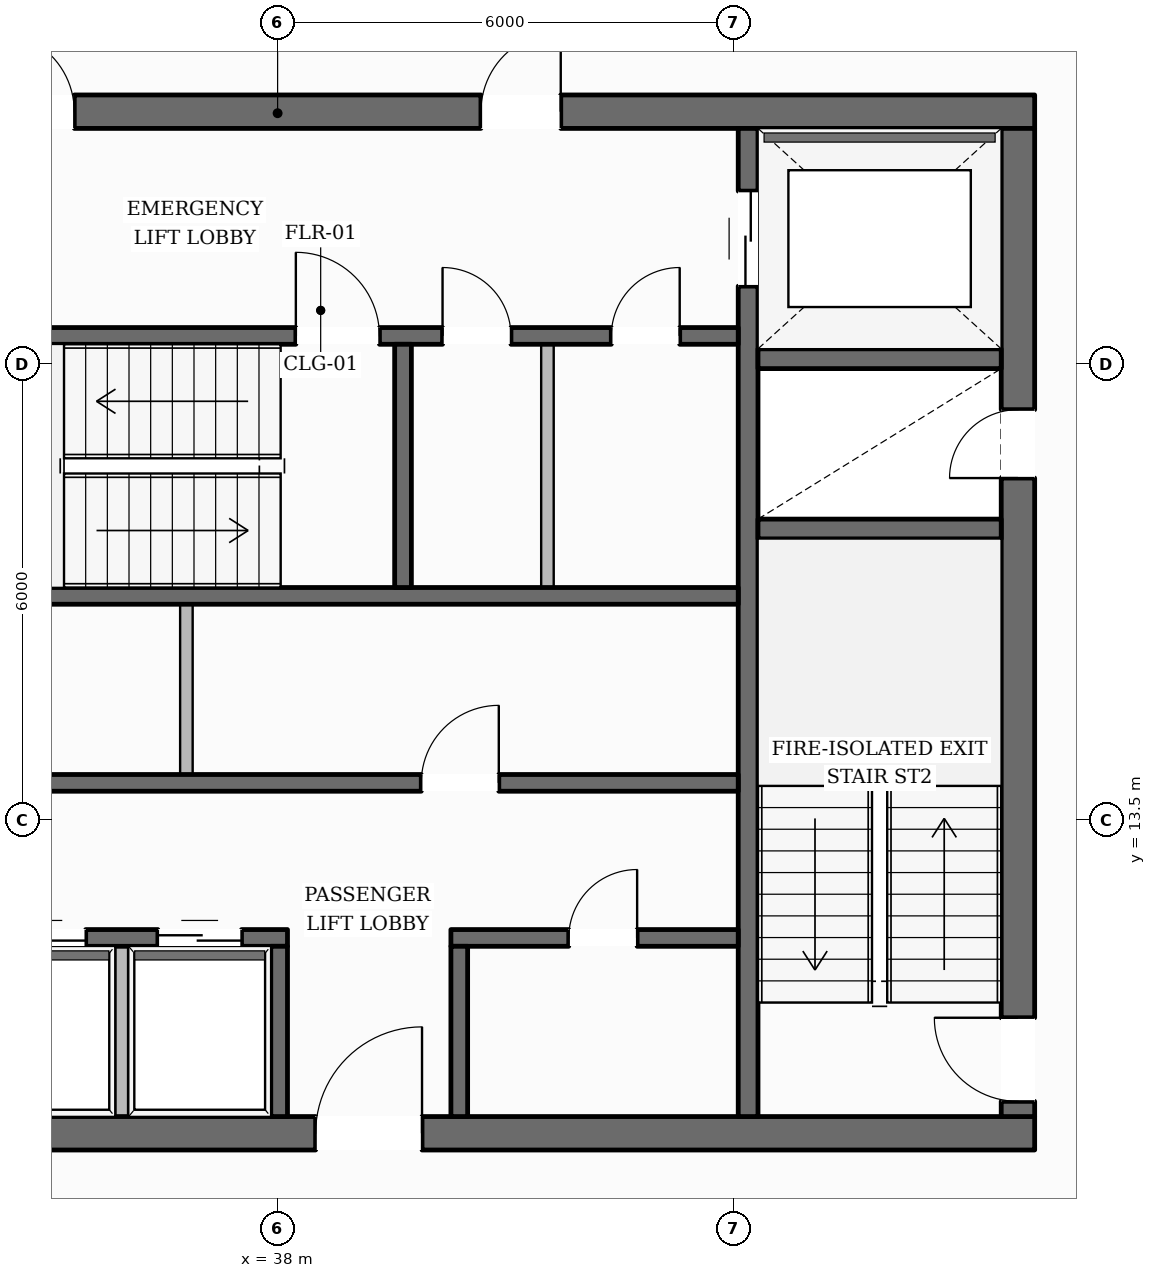
"""IFC4 building model, lengths in metres.
Left out: names, types, materials, properties, quantities, classifications, styles, units other than length and angle.
Written with IfcOpenShell. Run it as: python <this file> out.ifc"""

import sys

from ifc_helpers import new_model, si_unit, direction, frame, frame_2d, origin, place, context, subcontext, project, spatial, rectangle, extrude, element, fill, save


model = new_model("IFC4")
c1 = context("Model", 3, precision=1e-05, world=origin(), true_north=direction((0.0, 1.0)))
c2 = subcontext(c1, "Body", "Model", "MODEL_VIEW")
j1 = project(units=[si_unit("LENGTHUNIT", "METRE"), si_unit("PLANEANGLEUNIT", "RADIAN")], contexts=[c1])
p1 = place(None, origin())
s1 = spatial("IfcSite", under=j1, at=p1, CompositionType="ELEMENT")
p2 = place(p1, origin())
s2 = spatial("IfcBuilding", under=s1, at=p2, CompositionType="ELEMENT")
p3 = place(p2, frame((0.0, 0.0, 226.6)))
s3 = spatial("IfcBuildingStorey", under=s2, at=p3, CompositionType="ELEMENT", Elevation=226.6)
p4 = place(p3, frame((28.04, 9.38, 0.0), z_axis=(0.0, 0.0, 1.0), x_axis=(1.0, 0.0, 0.0)))
e1 = element("IfcWall", 1, at=p4, inside=s3, PredefinedType="SOLIDWALL", context=c2, shape_type="SweptSolid", body=[
    extrude(rectangle(XDim=19.92, YDim=0.44, at=frame_2d((9.96, 0.0))), origin(), (0.0, 0.0, 1.0), 3.6),
])
p5 = place(p4, frame((10.46, 0.0, 0.0)))
e2 = element("IfcOpeningElement", 2, at=p5, cuts=e1, PredefinedType="OPENING", context=c2, shape_type="SweptSolid", body=[
    extrude(rectangle(XDim=1.4, YDim=2.2, at=frame_2d((0.7, 1.1))), frame((0.0, 0.23, 0.0), z_axis=(0.0, -1.0, 0.0), x_axis=(1.0, 0.0, 0.0)), (0.0, 0.0, 1.0), 0.46),
])
p6 = place(p3, frame((28.04, 22.82, 0.0), z_axis=(0.0, 0.0, 1.0), x_axis=(1.0, 0.0, 0.0)))
e3 = element("IfcWall", 3, at=p6, inside=s3, PredefinedType="SOLIDWALL", context=c2, shape_type="SweptSolid", body=[
    extrude(rectangle(XDim=19.92, YDim=0.44, at=frame_2d((9.96, 0.0))), origin(), (0.0, 0.0, 1.0), 3.6),
])
p7 = place(p6, frame((6.235, 0.0, 0.0)))
e4 = element("IfcOpeningElement", 4, at=p7, cuts=e3, PredefinedType="OPENING", context=c2, shape_type="SweptSolid", body=[
    extrude(rectangle(XDim=1.05, YDim=2.15, at=frame_2d((0.525, 1.075))), frame((0.0, 0.23, 0.0), z_axis=(0.0, -1.0, 0.0), x_axis=(1.0, 0.0, 0.0)), (0.0, 0.0, 1.0), 0.46),
])
p8 = place(p6, frame((12.635, 0.0, 0.0)))
e5 = element("IfcOpeningElement", 5, at=p8, cuts=e3, PredefinedType="OPENING", context=c2, shape_type="SweptSolid", body=[
    extrude(rectangle(XDim=1.05, YDim=2.15, at=frame_2d((0.525, 1.075))), frame((0.0, 0.23, 0.0), z_axis=(0.0, -1.0, 0.0), x_axis=(1.0, 0.0, 0.0)), (0.0, 0.0, 1.0), 0.46),
])
p9 = place(p3, frame((47.74, 9.6, 0.0), z_axis=(0.0, 0.0, 1.0), x_axis=(0.0, 1.0, 0.0)))
e6 = element("IfcWall", 6, at=p9, inside=s3, PredefinedType="SOLIDWALL", context=c2, shape_type="SweptSolid", body=[
    extrude(rectangle(XDim=13.0, YDim=0.44, at=frame_2d((6.5, 0.0))), origin(), (0.0, 0.0, 1.0), 3.6),
])
p10 = place(p9, frame((0.2, 0.0, 0.0)))
e7 = element("IfcOpeningElement", 7, at=p10, cuts=e6, PredefinedType="OPENING", context=c2, shape_type="SweptSolid", body=[
    extrude(rectangle(XDim=1.1, YDim=2.15, at=frame_2d((0.55, 1.075))), frame((0.0, 0.23, 0.0), z_axis=(0.0, -1.0, 0.0), x_axis=(1.0, 0.0, 0.0)), (0.0, 0.0, 1.0), 0.46),
])
p11 = place(p9, frame((8.4, 0.0, 0.0)))
e8 = element("IfcOpeningElement", 8, at=p11, cuts=e6, PredefinedType="OPENING", context=c2, shape_type="SweptSolid", body=[
    extrude(rectangle(XDim=0.9, YDim=2.1, at=frame_2d((0.45, 1.05))), frame((0.0, 0.23, 0.0), z_axis=(0.0, -1.0, 0.0), x_axis=(1.0, 0.0, 0.0)), (0.0, 0.0, 1.0), 0.46),
])
p12 = place(p3, frame((44.19, 9.6, 0.0), z_axis=(0.0, 0.0, 1.0), x_axis=(0.0, 1.0, 0.0)))
e9 = element("IfcWall", 9, at=p12, inside=s3, PredefinedType="SHEAR", context=c2, shape_type="SweptSolid", body=[
    extrude(rectangle(XDim=13.0, YDim=0.26, at=frame_2d((6.5, 0.0))), origin(), (0.0, 0.0, 1.0), 3.6),
])
p13 = place(p12, frame((10.925, 0.0, 0.0)))
e10 = element("IfcOpeningElement", 10, at=p13, cuts=e9, PredefinedType="OPENING", context=c2, shape_type="SweptSolid", body=[
    extrude(rectangle(XDim=1.25, YDim=2.25, at=frame_2d((0.625, 1.125))), frame((0.0, 0.14, 0.0), z_axis=(0.0, -1.0, 0.0), x_axis=(1.0, 0.0, 0.0)), (0.0, 0.0, 1.0), 0.28),
])
for number, where, z_axis, x_axis in (
    (11, (44.32, 17.33, 0.0), (0.0, 0.0, 1.0), (1.0, 0.0, 0.0)),
    (12, (44.32, 19.57, 0.0), (0.0, 0.0, 1.0), (1.0, 0.0, 0.0)),
):
    element("IfcWall", number, at=place(p3, frame(where, z_axis=z_axis, x_axis=x_axis)), inside=s3, PredefinedType="SHEAR", context=c2, shape_type="SweptSolid", body=[
        extrude(rectangle(XDim=3.2, YDim=0.26, at=frame_2d((1.6, 0.0))), origin(), (0.0, 0.0, 1.0), 3.6),
    ])
p14 = place(p3, frame((31.94, 19.87, 0.0), z_axis=(0.0, 0.0, 1.0), x_axis=(1.0, 0.0, 0.0)))
e13 = element("IfcWall", 13, at=p14, inside=s3, PredefinedType="SOLIDWALL", context=c2, shape_type="SweptSolid", body=[
    extrude(rectangle(XDim=12.12, YDim=0.22, at=frame_2d((6.06, 0.0))), origin(), (0.0, 0.0, 1.0), 3.6),
])
p15 = place(p14, frame((6.3, 0.0, 0.0)))
e14 = element("IfcOpeningElement", 14, at=p15, cuts=e13, PredefinedType="OPENING", context=c2, shape_type="SweptSolid", body=[
    extrude(rectangle(XDim=1.1, YDim=2.15, at=frame_2d((0.55, 1.075))), frame((0.0, 0.12, 0.0), z_axis=(0.0, -1.0, 0.0), x_axis=(1.0, 0.0, 0.0)), (0.0, 0.0, 1.0), 0.24),
])
p16 = place(p14, frame((8.23, 0.0, 0.0)))
e15 = element("IfcOpeningElement", 15, at=p16, cuts=e13, PredefinedType="OPENING", context=c2, shape_type="SweptSolid", body=[
    extrude(rectangle(XDim=0.9, YDim=2.1, at=frame_2d((0.45, 1.05))), frame((0.0, 0.12, 0.0), z_axis=(0.0, -1.0, 0.0), x_axis=(1.0, 0.0, 0.0)), (0.0, 0.0, 1.0), 0.24),
])
p17 = place(p14, frame((10.45, 0.0, 0.0)))
e16 = element("IfcOpeningElement", 16, at=p17, cuts=e13, PredefinedType="OPENING", context=c2, shape_type="SweptSolid", body=[
    extrude(rectangle(XDim=0.9, YDim=2.1, at=frame_2d((0.45, 1.05))), frame((0.0, 0.12, 0.0), z_axis=(0.0, -1.0, 0.0), x_axis=(1.0, 0.0, 0.0)), (0.0, 0.0, 1.0), 0.24),
])
p18 = place(p3, frame((31.94, 16.45, 0.0), z_axis=(0.0, 0.0, 1.0), x_axis=(1.0, 0.0, 0.0)))
e17 = element("IfcWall", 17, at=p18, inside=s3, PredefinedType="SOLIDWALL", context=c2, shape_type="SweptSolid", body=[
    extrude(rectangle(XDim=12.12, YDim=0.22, at=frame_2d((6.06, 0.0))), origin(), (0.0, 0.0, 1.0), 3.6),
])
p19 = place(p3, frame((39.65, 16.56, 0.0), z_axis=(0.0, 0.0, 1.0), x_axis=(0.0, 1.0, 0.0)))
e18 = element("IfcWall", 18, at=p19, inside=s3, PredefinedType="SOLIDWALL", context=c2, shape_type="SweptSolid", body=[
    extrude(rectangle(XDim=3.2, YDim=0.22, at=frame_2d((1.6, 0.0))), origin(), (0.0, 0.0, 1.0), 3.6),
])
p20 = place(p3, frame((31.94, 13.99, 0.0), z_axis=(0.0, 0.0, 1.0), x_axis=(1.0, 0.0, 0.0)))
e19 = element("IfcWall", 19, at=p20, inside=s3, PredefinedType="SOLIDWALL", context=c2, shape_type="SweptSolid", body=[
    extrude(rectangle(XDim=12.12, YDim=0.22, at=frame_2d((6.06, 0.0))), origin(), (0.0, 0.0, 1.0), 3.6),
])
p21 = place(p20, frame((1.91, 0.0, 0.0)))
e20 = element("IfcOpeningElement", 20, at=p21, cuts=e19, PredefinedType="OPENING", context=c2, shape_type="SweptSolid", body=[
    extrude(rectangle(XDim=0.9, YDim=2.1, at=frame_2d((0.45, 1.05))), frame((0.0, 0.12, 0.0), z_axis=(0.0, -1.0, 0.0), x_axis=(1.0, 0.0, 0.0)), (0.0, 0.0, 1.0), 0.24),
])
p22 = place(p20, frame((7.95, 0.0, 0.0)))
e21 = element("IfcOpeningElement", 21, at=p22, cuts=e19, PredefinedType="OPENING", context=c2, shape_type="SweptSolid", body=[
    extrude(rectangle(XDim=1.02, YDim=2.15, at=frame_2d((0.51, 1.075))), frame((0.0, 0.12, 0.0), z_axis=(0.0, -1.0, 0.0), x_axis=(1.0, 0.0, 0.0)), (0.0, 0.0, 1.0), 0.24),
])
p23 = place(p3, frame((31.94, 11.95, 0.0), z_axis=(0.0, 0.0, 1.0), x_axis=(1.0, 0.0, 0.0)))
e22 = element("IfcWall", 22, at=p23, inside=s3, PredefinedType="SOLIDWALL", context=c2, shape_type="SweptSolid", body=[
    extrude(rectangle(XDim=6.19, YDim=0.22, at=frame_2d((3.095, 0.0))), origin(), (0.0, 0.0, 1.0), 3.6),
])
p24 = place(p23, frame((0.385, 0.0, 0.0)))
e23 = element("IfcOpeningElement", 23, at=p24, cuts=e22, PredefinedType="OPENING", context=c2, shape_type="SweptSolid", body=[
    extrude(rectangle(XDim=1.1, YDim=2.2, at=frame_2d((0.55, 1.1))), frame((0.0, 0.12, 0.0), z_axis=(0.0, -1.0, 0.0), x_axis=(1.0, 0.0, 0.0)), (0.0, 0.0, 1.0), 0.24),
])
p25 = place(p23, frame((2.435, 0.0, 0.0)))
e24 = element("IfcOpeningElement", 24, at=p25, cuts=e22, PredefinedType="OPENING", context=c2, shape_type="SweptSolid", body=[
    extrude(rectangle(XDim=1.1, YDim=2.2, at=frame_2d((0.55, 1.1))), frame((0.0, 0.12, 0.0), z_axis=(0.0, -1.0, 0.0), x_axis=(1.0, 0.0, 0.0)), (0.0, 0.0, 1.0), 0.24),
])
p26 = place(p23, frame((4.485, 0.0, 0.0)))
e25 = element("IfcOpeningElement", 25, at=p26, cuts=e22, PredefinedType="OPENING", context=c2, shape_type="SweptSolid", body=[
    extrude(rectangle(XDim=1.1, YDim=2.2, at=frame_2d((0.55, 1.1))), frame((0.0, 0.12, 0.0), z_axis=(0.0, -1.0, 0.0), x_axis=(1.0, 0.0, 0.0)), (0.0, 0.0, 1.0), 0.24),
])
p27 = place(p3, frame((40.28, 11.95, 0.0), z_axis=(0.0, 0.0, 1.0), x_axis=(1.0, 0.0, 0.0)))
e26 = element("IfcWall", 26, at=p27, inside=s3, PredefinedType="SOLIDWALL", context=c2, shape_type="SweptSolid", body=[
    extrude(rectangle(XDim=3.78, YDim=0.22, at=frame_2d((1.89, 0.0))), origin(), (0.0, 0.0, 1.0), 3.6),
])
p28 = place(p27, frame((1.55, 0.0, 0.0)))
e27 = element("IfcOpeningElement", 27, at=p28, cuts=e26, PredefinedType="OPENING", context=c2, shape_type="SweptSolid", body=[
    extrude(rectangle(XDim=0.9, YDim=2.1, at=frame_2d((0.45, 1.05))), frame((0.0, 0.12, 0.0), z_axis=(0.0, -1.0, 0.0), x_axis=(1.0, 0.0, 0.0)), (0.0, 0.0, 1.0), 0.24),
])
for number, where, z_axis, x_axis in (
    (28, (38.02, 9.6, 0.0), (0.0, 0.0, 1.0), (0.0, 1.0, 0.0)),
    (29, (40.39, 9.6, 0.0), (0.0, 0.0, 1.0), (0.0, 1.0, 0.0)),
):
    element("IfcWall", number, at=place(p3, frame(where, z_axis=z_axis, x_axis=x_axis)), inside=s3, PredefinedType="SOLIDWALL", context=c2, shape_type="SweptSolid", body=[
        extrude(rectangle(XDim=2.24, YDim=0.22, at=frame_2d((1.12, 0.0))), origin(), (0.0, 0.0, 1.0), 3.6),
    ])
p29 = place(p3, frame((41.74, 45.312, 0.0), z_axis=(0.0, 0.0, 1.0), x_axis=(0.491560367125, -0.870843502285, 0.0)))
e30 = element("IfcWall", 30, at=p29, inside=s3, PredefinedType="STANDARD", context=c2, shape_type="SweptSolid", body=[
    extrude(rectangle(XDim=39.17, YDim=0.35, at=frame_2d((19.585, 0.0))), origin(), (0.0, 0.0, 1.0), 3.132),
])
p30 = place(p29, frame((34.788, 0.0, 0.65)))
e31 = element("IfcOpeningElement", 31, at=p30, cuts=e30, PredefinedType="OPENING", context=c2, shape_type="SweptSolid", body=[
    extrude(rectangle(XDim=1.45, YDim=1.75, at=frame_2d((0.725, 0.875))), frame((0.0, 0.185, 0.0), z_axis=(0.0, -1.0, 0.0), x_axis=(1.0, 0.0, 0.0)), (0.0, 0.0, 1.0), 0.37),
])
p31 = place(p29, frame((28.419, 0.0, 0.65)))
e32 = element("IfcOpeningElement", 32, at=p31, cuts=e30, PredefinedType="OPENING", context=c2, shape_type="SweptSolid", body=[
    extrude(rectangle(XDim=1.45, YDim=1.75, at=frame_2d((0.725, 0.875))), frame((0.0, 0.185, 0.0), z_axis=(0.0, -1.0, 0.0), x_axis=(1.0, 0.0, 0.0)), (0.0, 0.0, 1.0), 0.37),
])
p32 = place(p29, frame((15.68, 0.0, 0.65)))
e33 = element("IfcOpeningElement", 33, at=p32, cuts=e30, PredefinedType="OPENING", context=c2, shape_type="SweptSolid", body=[
    extrude(rectangle(XDim=1.45, YDim=1.75, at=frame_2d((0.725, 0.875))), frame((0.0, 0.185, 0.0), z_axis=(0.0, -1.0, 0.0), x_axis=(1.0, 0.0, 0.0)), (0.0, 0.0, 1.0), 0.37),
])
p33 = place(p29, frame((9.311, 0.0, 0.65)))
e34 = element("IfcOpeningElement", 34, at=p33, cuts=e30, PredefinedType="OPENING", context=c2, shape_type="SweptSolid", body=[
    extrude(rectangle(XDim=1.45, YDim=1.75, at=frame_2d((0.725, 0.875))), frame((0.0, 0.185, 0.0), z_axis=(0.0, -1.0, 0.0), x_axis=(1.0, 0.0, 0.0)), (0.0, 0.0, 1.0), 0.37),
])
p34 = place(p29, frame((2.942, 0.0, 0.65)))
e35 = element("IfcOpeningElement", 35, at=p34, cuts=e30, PredefinedType="OPENING", context=c2, shape_type="SweptSolid", body=[
    extrude(rectangle(XDim=1.45, YDim=1.75, at=frame_2d((0.725, 0.875))), frame((0.0, 0.185, 0.0), z_axis=(0.0, -1.0, 0.0), x_axis=(1.0, 0.0, 0.0)), (0.0, 0.0, 1.0), 0.37),
])
p35 = place(p3, frame((35.95, 9.52, 0.0), z_axis=(0.0, 0.0, 1.0), x_axis=(0.0, 1.0, 0.0)))
e36 = element("IfcWall", 36, at=p35, inside=s3, PredefinedType="PARTITIONING", context=c2, shape_type="SweptSolid", body=[
    extrude(rectangle(XDim=2.32, YDim=0.165, at=frame_2d((1.16, 0.0))), origin(), (0.0, 0.0, 1.0), 3.6),
])
p36 = place(p3, frame((36.8, 14.1, 0.0), z_axis=(0.0, 0.0, 1.0), x_axis=(0.0, 1.0, 0.0)))
e37 = element("IfcWall", 37, at=p36, inside=s3, PredefinedType="PARTITIONING", context=c2, shape_type="SweptSolid", body=[
    extrude(rectangle(XDim=2.24, YDim=0.165, at=frame_2d((1.12, 0.0))), origin(), (0.0, 0.0, 1.0), 3.6),
])
p37 = place(p3, frame((41.55, 16.56, 0.0), z_axis=(0.0, 0.0, 1.0), x_axis=(0.0, 1.0, 0.0)))
e38 = element("IfcWall", 38, at=p37, inside=s3, PredefinedType="PARTITIONING", context=c2, shape_type="SweptSolid", body=[
    extrude(rectangle(XDim=3.2, YDim=0.165, at=frame_2d((1.6, 0.0))), origin(), (0.0, 0.0, 1.0), 3.6),
])
p38 = place(p10, origin())
e39 = element("IfcDoor", 39, at=p38, inside=s3, OperationType="SINGLE_SWING_RIGHT", PredefinedType="DOOR", context=c2, shape_type="SweptSolid", body=[
    extrude(rectangle(XDim=1.1, YDim=2.15, at=frame_2d((0.55, 1.075))), frame((0.0, 0.025, 0.0), z_axis=(0.0, -1.0, 0.0), x_axis=(1.0, 0.0, 0.0)), (0.0, 0.0, 1.0), 0.05),
])
fill(e7, e39)
p39 = place(p15, origin())
e40 = element("IfcDoor", 40, at=p39, inside=s3, OperationType="SINGLE_SWING_LEFT", PredefinedType="DOOR", context=c2, shape_type="SweptSolid", body=[
    extrude(rectangle(XDim=1.1, YDim=2.15, at=frame_2d((0.55, 1.075))), frame((0.0, 0.025, 0.0), z_axis=(0.0, -1.0, 0.0), x_axis=(1.0, 0.0, 0.0)), (0.0, 0.0, 1.0), 0.05),
])
fill(e14, e40)
p40 = place(p11, origin())
e41 = element("IfcDoor", 41, at=p40, inside=s3, OperationType="SINGLE_SWING_LEFT", PredefinedType="DOOR", context=c2, shape_type="SweptSolid", body=[
    extrude(rectangle(XDim=0.9, YDim=2.1, at=frame_2d((0.45, 1.05))), frame((0.0, 0.025, 0.0), z_axis=(0.0, -1.0, 0.0), x_axis=(1.0, 0.0, 0.0)), (0.0, 0.0, 1.0), 0.05),
])
fill(e8, e41)
p41 = place(p7, origin())
e42 = element("IfcDoor", 42, at=p41, inside=s3, OperationType="SINGLE_SWING_LEFT", PredefinedType="DOOR", context=c2, shape_type="SweptSolid", body=[
    extrude(rectangle(XDim=1.05, YDim=2.15, at=frame_2d((0.525, 1.075))), frame((0.0, 0.025, 0.0), z_axis=(0.0, -1.0, 0.0), x_axis=(1.0, 0.0, 0.0)), (0.0, 0.0, 1.0), 0.05),
])
fill(e4, e42)
p42 = place(p8, origin())
e43 = element("IfcDoor", 43, at=p42, inside=s3, OperationType="SINGLE_SWING_RIGHT", PredefinedType="DOOR", context=c2, shape_type="SweptSolid", body=[
    extrude(rectangle(XDim=1.05, YDim=2.15, at=frame_2d((0.525, 1.075))), frame((0.0, 0.025, 0.0), z_axis=(0.0, -1.0, 0.0), x_axis=(1.0, 0.0, 0.0)), (0.0, 0.0, 1.0), 0.05),
])
fill(e5, e43)
p43 = place(p13, origin())
e44 = element("IfcDoor", 44, at=p43, inside=s3, OperationType="DOUBLE_DOOR_SLIDING", PredefinedType="DOOR", context=c2, shape_type="SweptSolid", body=[
    extrude(rectangle(XDim=1.25, YDim=2.25, at=frame_2d((0.625, 1.125))), frame((0.0, 0.025, 0.0), z_axis=(0.0, -1.0, 0.0), x_axis=(1.0, 0.0, 0.0)), (0.0, 0.0, 1.0), 0.05),
])
fill(e10, e44)
p44 = place(p5, origin())
e45 = element("IfcDoor", 45, at=p44, inside=s3, OperationType="SINGLE_SWING_RIGHT", PredefinedType="DOOR", context=c2, shape_type="SweptSolid", body=[
    extrude(rectangle(XDim=1.4, YDim=2.2, at=frame_2d((0.7, 1.1))), frame((0.0, 0.025, 0.0), z_axis=(0.0, -1.0, 0.0), x_axis=(1.0, 0.0, 0.0)), (0.0, 0.0, 1.0), 0.05),
])
fill(e2, e45)
p45 = place(p25, origin())
e46 = element("IfcDoor", 46, at=p45, inside=s3, OperationType="DOUBLE_DOOR_SLIDING", PredefinedType="DOOR", context=c2, shape_type="SweptSolid", body=[
    extrude(rectangle(XDim=1.1, YDim=2.2, at=frame_2d((0.55, 1.1))), frame((0.0, 0.025, 0.0), z_axis=(0.0, -1.0, 0.0), x_axis=(1.0, 0.0, 0.0)), (0.0, 0.0, 1.0), 0.05),
])
fill(e24, e46)
p46 = place(p26, origin())
e47 = element("IfcDoor", 47, at=p46, inside=s3, OperationType="DOUBLE_DOOR_SLIDING", PredefinedType="DOOR", context=c2, shape_type="SweptSolid", body=[
    extrude(rectangle(XDim=1.1, YDim=2.2, at=frame_2d((0.55, 1.1))), frame((0.0, 0.025, 0.0), z_axis=(0.0, -1.0, 0.0), x_axis=(1.0, 0.0, 0.0)), (0.0, 0.0, 1.0), 0.05),
])
fill(e25, e47)
p47 = place(p22, origin())
e48 = element("IfcDoor", 48, at=p47, inside=s3, OperationType="SINGLE_SWING_RIGHT", PredefinedType="DOOR", context=c2, shape_type="SweptSolid", body=[
    extrude(rectangle(XDim=1.02, YDim=2.15, at=frame_2d((0.51, 1.075))), frame((0.0, 0.025, 0.0), z_axis=(0.0, -1.0, 0.0), x_axis=(1.0, 0.0, 0.0)), (0.0, 0.0, 1.0), 0.05),
])
fill(e21, e48)
p48 = place(p16, origin())
e49 = element("IfcDoor", 49, at=p48, inside=s3, OperationType="SINGLE_SWING_LEFT", PredefinedType="DOOR", context=c2, shape_type="SweptSolid", body=[
    extrude(rectangle(XDim=0.9, YDim=2.1, at=frame_2d((0.45, 1.05))), frame((0.0, 0.025, 0.0), z_axis=(0.0, -1.0, 0.0), x_axis=(1.0, 0.0, 0.0)), (0.0, 0.0, 1.0), 0.05),
])
fill(e15, e49)
p49 = place(p17, origin())
e50 = element("IfcDoor", 50, at=p49, inside=s3, OperationType="SINGLE_SWING_RIGHT", PredefinedType="DOOR", context=c2, shape_type="SweptSolid", body=[
    extrude(rectangle(XDim=0.9, YDim=2.1, at=frame_2d((0.45, 1.05))), frame((0.0, 0.025, 0.0), z_axis=(0.0, -1.0, 0.0), x_axis=(1.0, 0.0, 0.0)), (0.0, 0.0, 1.0), 0.05),
])
fill(e16, e50)
p50 = place(p28, origin())
e51 = element("IfcDoor", 51, at=p50, inside=s3, OperationType="SINGLE_SWING_RIGHT", PredefinedType="DOOR", context=c2, shape_type="SweptSolid", body=[
    extrude(rectangle(XDim=0.9, YDim=2.1, at=frame_2d((0.45, 1.05))), frame((0.0, 0.025, 0.0), z_axis=(0.0, -1.0, 0.0), x_axis=(1.0, 0.0, 0.0)), (0.0, 0.0, 1.0), 0.05),
])
fill(e27, e51)
save(model, sys.argv[1])
